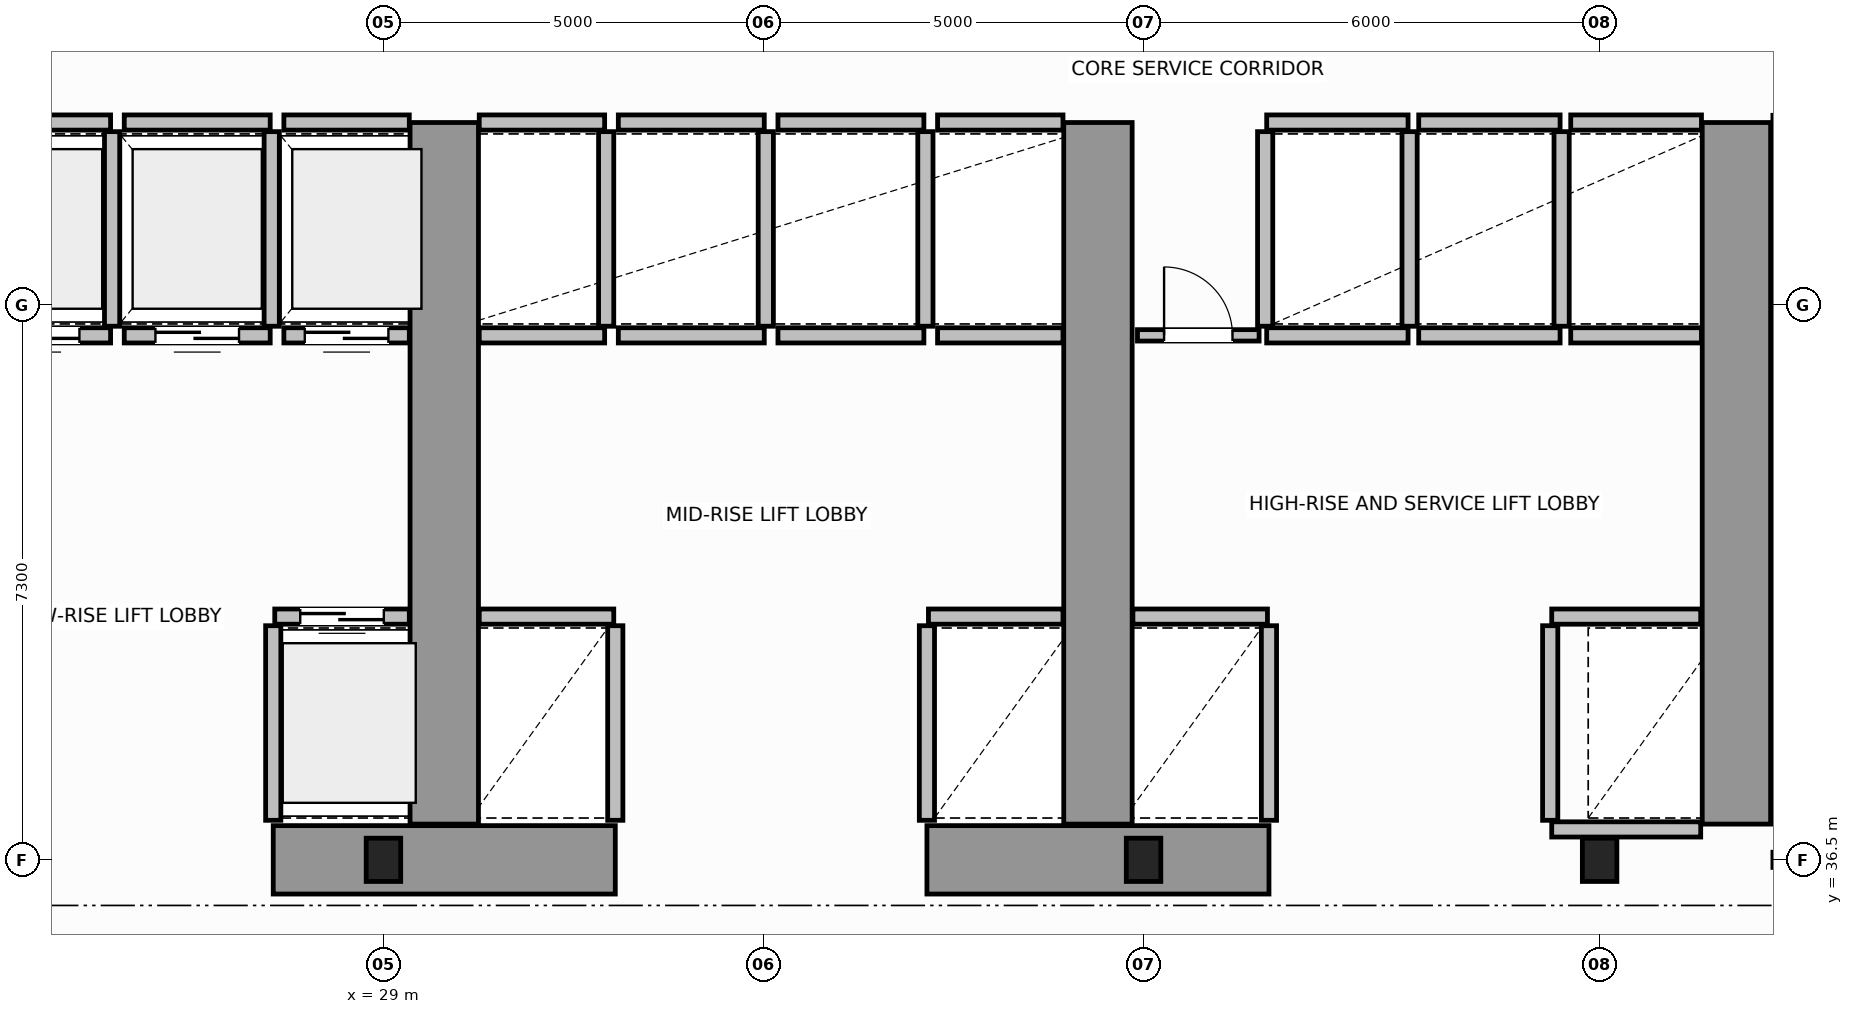
"""IFC4 building model, lengths in metres.
Left out: names, types, materials, properties, quantities, classifications, styles, units other than length and angle.
Written with IfcOpenShell. Run it as: python <this file> out.ifc"""

import sys

from ifc_helpers import new_model, si_unit, direction, frame, frame_2d, origin, origin_2d, place, context, subcontext, project, spatial, rectangle, i_section, extrude, source, transform, mapped, element, fill, save


model = new_model("IFC4")
c1 = context("Model", 3, precision=1e-05, world=origin(), true_north=direction((0.0, 1.0)))
c2 = subcontext(c1, "Body", "Model", "MODEL_VIEW")
j1 = project(units=[si_unit("LENGTHUNIT", "METRE"), si_unit("PLANEANGLEUNIT", "RADIAN")], contexts=[c1])
p1 = place(None, origin())
s1 = spatial("IfcSite", under=j1, at=p1, CompositionType="ELEMENT")
p2 = place(p1, origin())
s2 = spatial("IfcBuilding", under=s1, at=p2, CompositionType="ELEMENT")
p3 = place(p2, frame((0.0, 0.0, 37.8)))
s3 = spatial("IfcBuildingStorey", under=s2, at=p3, CompositionType="ELEMENT", Elevation=37.8)
m1 = source(origin(), c2, "Body", "SweptSolid", [
    extrude(i_section(OverallWidth=0.454, OverallDepth=0.569, WebThickness=0.078, FlangeThickness=0.08, FilletRadius=0.015, at=origin_2d()), origin(), (0.0, 0.0, 1.0), 3.8),
])
for number, where, z_axis, x_axis in (
    (1, (29.0, 36.5, 0.0), (0.0, 0.0, 1.0), (1.0, 0.0, 0.0)),
    (2, (39.0, 36.5, 0.0), (0.0, 0.0, 1.0), (1.0, 0.0, 0.0)),
    (3, (45.0, 36.5, 0.0), (0.0, 0.0, 1.0), (1.0, 0.0, 0.0)),
):
    element("IfcColumn", number, at=place(p3, frame(where, z_axis=z_axis, x_axis=x_axis)), inside=s3, PredefinedType="COLUMN", context=c2, shape_type="MappedRepresentation", body=[
        mapped(m1, transform((0.0, 0.0, 0.0), scale=1.0)),
    ])
for number, where, z_axis, x_axis in (
    (4, (27.55, 36.5, 0.0), (0.0, 0.0, 1.0), (1.0, 0.0, 0.0)),
    (5, (36.15, 36.5, 0.0), (0.0, 0.0, 1.0), (1.0, 0.0, 0.0)),
):
    element("IfcWall", number, at=place(p3, frame(where, z_axis=z_axis, x_axis=x_axis)), inside=s3, PredefinedType="SHEAR", context=c2, shape_type="SweptSolid", body=[
        extrude(rectangle(XDim=4.5, YDim=0.9, at=frame_2d((2.25, 0.0))), origin(), (0.0, 0.0, 1.0), 3.8),
    ])
for number, where, z_axis, x_axis in (
    (6, (29.8, 36.97, 0.0), (0.0, 0.0, 1.0), (0.0, 1.0, 0.0)),
    (7, (38.4, 36.97, 0.0), (0.0, 0.0, 1.0), (0.0, 1.0, 0.0)),
    (8, (46.8, 36.97, 0.0), (0.0, 0.0, 1.0), (0.0, 1.0, 0.0)),
):
    element("IfcWall", number, at=place(p3, frame(where, z_axis=z_axis, x_axis=x_axis)), inside=s3, PredefinedType="SHEAR", context=c2, shape_type="SweptSolid", body=[
        extrude(rectangle(XDim=9.23, YDim=0.9, at=frame_2d((4.615, 0.0))), origin(), (0.0, 0.0, 1.0), 3.8),
    ])
p4 = place(p3, frame((47.28, 36.5, 0.0), z_axis=(0.0, 0.0, 1.0), x_axis=(1.0, 0.0, 0.0)))
e9 = element("IfcWall", 9, at=p4, inside=s3, PredefinedType="SOLIDWALL", context=c2, shape_type="SweptSolid", body=[
    extrude(rectangle(XDim=2.47, YDim=0.2, at=frame_2d((1.235, 0.0))), origin(), (0.0, 0.0, 1.0), 2.37),
])
p5 = place(p4, frame((0.65, 0.0, 0.0)))
e10 = element("IfcOpeningElement", 10, at=p5, cuts=e9, PredefinedType="OPENING", context=c2, shape_type="SweptSolid", body=[
    extrude(rectangle(XDim=1.1, YDim=2.15, at=frame_2d((0.55, 1.075))), frame((0.0, 0.11, 0.0), z_axis=(0.0, -1.0, 0.0), x_axis=(1.0, 0.0, 0.0)), (0.0, 0.0, 1.0), 0.22),
])
p6 = place(p3, frame((27.57, 39.7, 0.0), z_axis=(0.0, 0.0, 1.0), x_axis=(1.0, 0.0, 0.0)))
e11 = element("IfcWall", 11, at=p6, inside=s3, PredefinedType="SOLIDWALL", context=c2, shape_type="SweptSolid", body=[
    extrude(rectangle(XDim=1.77, YDim=0.2, at=frame_2d((0.885, 0.0))), origin(), (0.0, 0.0, 1.0), 3.58),
])
p7 = place(p6, frame((0.335, 0.0, 0.0)))
e12 = element("IfcOpeningElement", 12, at=p7, cuts=e11, PredefinedType="OPENING", context=c2, shape_type="SweptSolid", body=[
    extrude(rectangle(XDim=1.1, YDim=2.15, at=frame_2d((0.55, 1.075))), frame((0.0, 0.11, 0.0), z_axis=(0.0, -1.0, 0.0), x_axis=(1.0, 0.0, 0.0)), (0.0, 0.0, 1.0), 0.22),
])
p8 = place(p3, frame((27.55, 37.02, 0.0), z_axis=(0.0, 0.0, 1.0), x_axis=(0.0, 1.0, 0.0)))
e13 = element("IfcWall", 13, at=p8, inside=s3, PredefinedType="SOLIDWALL", context=c2, shape_type="SweptSolid", body=[
    extrude(rectangle(XDim=2.56, YDim=0.2, at=frame_2d((1.28, 0.0))), origin(), (0.0, 0.0, 1.0), 3.58),
])
p9 = place(p3, frame((23.49, 43.4, 0.0), z_axis=(0.0, 0.0, 1.0), x_axis=(1.0, 0.0, 0.0)))
e14 = element("IfcWall", 14, at=p9, inside=s3, PredefinedType="SOLIDWALL", context=c2, shape_type="SweptSolid", body=[
    extrude(rectangle(XDim=1.92, YDim=0.2, at=frame_2d((0.96, 0.0))), origin(), (0.0, 0.0, 1.0), 3.58),
])
p10 = place(p9, frame((0.41, 0.0, 0.0)))
e15 = element("IfcOpeningElement", 15, at=p10, cuts=e14, PredefinedType="OPENING", context=c2, shape_type="SweptSolid", body=[
    extrude(rectangle(XDim=1.1, YDim=2.15, at=frame_2d((0.55, 1.075))), frame((0.0, 0.11, 0.0), z_axis=(0.0, -1.0, 0.0), x_axis=(1.0, 0.0, 0.0)), (0.0, 0.0, 1.0), 0.22),
])
p11 = place(p3, frame((23.49, 46.2, 0.0), z_axis=(0.0, 0.0, 1.0), x_axis=(1.0, 0.0, 0.0)))
e16 = element("IfcWall", 16, at=p11, inside=s3, PredefinedType="SOLIDWALL", context=c2, shape_type="SweptSolid", body=[
    extrude(rectangle(XDim=1.92, YDim=0.2, at=frame_2d((0.96, 0.0))), origin(), (0.0, 0.0, 1.0), 3.58),
])
p12 = place(p3, frame((25.43, 43.52, 0.0), z_axis=(0.0, 0.0, 1.0), x_axis=(0.0, 1.0, 0.0)))
e17 = element("IfcWall", 17, at=p12, inside=s3, PredefinedType="SOLIDWALL", context=c2, shape_type="SweptSolid", body=[
    extrude(rectangle(XDim=2.56, YDim=0.2, at=frame_2d((1.28, 0.0))), origin(), (0.0, 0.0, 1.0), 3.58),
])
p13 = place(p3, frame((25.59, 43.4, 0.0), z_axis=(0.0, 0.0, 1.0), x_axis=(1.0, 0.0, 0.0)))
e18 = element("IfcWall", 18, at=p13, inside=s3, PredefinedType="SOLIDWALL", context=c2, shape_type="SweptSolid", body=[
    extrude(rectangle(XDim=1.92, YDim=0.2, at=frame_2d((0.96, 0.0))), origin(), (0.0, 0.0, 1.0), 3.58),
])
p14 = place(p13, frame((0.41, 0.0, 0.0)))
e19 = element("IfcOpeningElement", 19, at=p14, cuts=e18, PredefinedType="OPENING", context=c2, shape_type="SweptSolid", body=[
    extrude(rectangle(XDim=1.1, YDim=2.15, at=frame_2d((0.55, 1.075))), frame((0.0, 0.11, 0.0), z_axis=(0.0, -1.0, 0.0), x_axis=(1.0, 0.0, 0.0)), (0.0, 0.0, 1.0), 0.22),
])
p15 = place(p3, frame((25.59, 46.2, 0.0), z_axis=(0.0, 0.0, 1.0), x_axis=(1.0, 0.0, 0.0)))
e20 = element("IfcWall", 20, at=p15, inside=s3, PredefinedType="SOLIDWALL", context=c2, shape_type="SweptSolid", body=[
    extrude(rectangle(XDim=1.92, YDim=0.2, at=frame_2d((0.96, 0.0))), origin(), (0.0, 0.0, 1.0), 3.58),
])
p16 = place(p3, frame((27.53, 43.52, 0.0), z_axis=(0.0, 0.0, 1.0), x_axis=(0.0, 1.0, 0.0)))
e21 = element("IfcWall", 21, at=p16, inside=s3, PredefinedType="SOLIDWALL", context=c2, shape_type="SweptSolid", body=[
    extrude(rectangle(XDim=2.56, YDim=0.2, at=frame_2d((1.28, 0.0))), origin(), (0.0, 0.0, 1.0), 3.58),
])
p17 = place(p3, frame((27.69, 43.4, 0.0), z_axis=(0.0, 0.0, 1.0), x_axis=(1.0, 0.0, 0.0)))
e22 = element("IfcWall", 22, at=p17, inside=s3, PredefinedType="SOLIDWALL", context=c2, shape_type="SweptSolid", body=[
    extrude(rectangle(XDim=1.65, YDim=0.2, at=frame_2d((0.825, 0.0))), origin(), (0.0, 0.0, 1.0), 3.58),
])
p18 = place(p17, frame((0.275, 0.0, 0.0)))
e23 = element("IfcOpeningElement", 23, at=p18, cuts=e22, PredefinedType="OPENING", context=c2, shape_type="SweptSolid", body=[
    extrude(rectangle(XDim=1.1, YDim=2.15, at=frame_2d((0.55, 1.075))), frame((0.0, 0.11, 0.0), z_axis=(0.0, -1.0, 0.0), x_axis=(1.0, 0.0, 0.0)), (0.0, 0.0, 1.0), 0.22),
])
p19 = place(p3, frame((27.69, 46.2, 0.0), z_axis=(0.0, 0.0, 1.0), x_axis=(1.0, 0.0, 0.0)))
e24 = element("IfcWall", 24, at=p19, inside=s3, PredefinedType="SOLIDWALL", context=c2, shape_type="SweptSolid", body=[
    extrude(rectangle(XDim=1.65, YDim=0.2, at=frame_2d((0.825, 0.0))), origin(), (0.0, 0.0, 1.0), 3.58),
])
p20 = place(p3, frame((30.26, 39.7, 0.0), z_axis=(0.0, 0.0, 1.0), x_axis=(1.0, 0.0, 0.0)))
e25 = element("IfcWall", 25, at=p20, inside=s3, PredefinedType="SOLIDWALL", context=c2, shape_type="SweptSolid", body=[
    extrude(rectangle(XDim=1.77, YDim=0.2, at=frame_2d((0.885, 0.0))), origin(), (0.0, 0.0, 1.0), 3.58),
])
p21 = place(p3, frame((32.05, 37.02, 0.0), z_axis=(0.0, 0.0, 1.0), x_axis=(0.0, 1.0, 0.0)))
e26 = element("IfcWall", 26, at=p21, inside=s3, PredefinedType="SOLIDWALL", context=c2, shape_type="SweptSolid", body=[
    extrude(rectangle(XDim=2.56, YDim=0.2, at=frame_2d((1.28, 0.0))), origin(), (0.0, 0.0, 1.0), 3.58),
])
p22 = place(p3, frame((36.17, 39.7, 0.0), z_axis=(0.0, 0.0, 1.0), x_axis=(1.0, 0.0, 0.0)))
e27 = element("IfcWall", 27, at=p22, inside=s3, PredefinedType="SOLIDWALL", context=c2, shape_type="SweptSolid", body=[
    extrude(rectangle(XDim=1.77, YDim=0.2, at=frame_2d((0.885, 0.0))), origin(), (0.0, 0.0, 1.0), 3.58),
])
p23 = place(p3, frame((36.15, 37.02, 0.0), z_axis=(0.0, 0.0, 1.0), x_axis=(0.0, 1.0, 0.0)))
e28 = element("IfcWall", 28, at=p23, inside=s3, PredefinedType="SOLIDWALL", context=c2, shape_type="SweptSolid", body=[
    extrude(rectangle(XDim=2.56, YDim=0.2, at=frame_2d((1.28, 0.0))), origin(), (0.0, 0.0, 1.0), 3.58),
])
for number, where, z_axis, x_axis in (
    (29, (30.26, 43.4, 0.0), (0.0, 0.0, 1.0), (1.0, 0.0, 0.0)),
    (30, (30.26, 46.2, 0.0), (0.0, 0.0, 1.0), (1.0, 0.0, 0.0)),
):
    element("IfcWall", number, at=place(p3, frame(where, z_axis=z_axis, x_axis=x_axis)), inside=s3, PredefinedType="SOLIDWALL", context=c2, shape_type="SweptSolid", body=[
        extrude(rectangle(XDim=1.65, YDim=0.2, at=frame_2d((0.825, 0.0))), origin(), (0.0, 0.0, 1.0), 3.58),
    ])
p24 = place(p3, frame((31.93, 43.52, 0.0), z_axis=(0.0, 0.0, 1.0), x_axis=(0.0, 1.0, 0.0)))
e31 = element("IfcWall", 31, at=p24, inside=s3, PredefinedType="SOLIDWALL", context=c2, shape_type="SweptSolid", body=[
    extrude(rectangle(XDim=2.56, YDim=0.2, at=frame_2d((1.28, 0.0))), origin(), (0.0, 0.0, 1.0), 3.58),
])
for number, where, z_axis, x_axis in (
    (32, (32.09, 43.4, 0.0), (0.0, 0.0, 1.0), (1.0, 0.0, 0.0)),
    (33, (32.09, 46.2, 0.0), (0.0, 0.0, 1.0), (1.0, 0.0, 0.0)),
):
    element("IfcWall", number, at=place(p3, frame(where, z_axis=z_axis, x_axis=x_axis)), inside=s3, PredefinedType="SOLIDWALL", context=c2, shape_type="SweptSolid", body=[
        extrude(rectangle(XDim=1.92, YDim=0.2, at=frame_2d((0.96, 0.0))), origin(), (0.0, 0.0, 1.0), 3.58),
    ])
p25 = place(p3, frame((34.03, 43.52, 0.0), z_axis=(0.0, 0.0, 1.0), x_axis=(0.0, 1.0, 0.0)))
e34 = element("IfcWall", 34, at=p25, inside=s3, PredefinedType="SOLIDWALL", context=c2, shape_type="SweptSolid", body=[
    extrude(rectangle(XDim=2.56, YDim=0.2, at=frame_2d((1.28, 0.0))), origin(), (0.0, 0.0, 1.0), 3.58),
])
for number, where, z_axis, x_axis in (
    (35, (34.19, 43.4, 0.0), (0.0, 0.0, 1.0), (1.0, 0.0, 0.0)),
    (36, (34.19, 46.2, 0.0), (0.0, 0.0, 1.0), (1.0, 0.0, 0.0)),
):
    element("IfcWall", number, at=place(p3, frame(where, z_axis=z_axis, x_axis=x_axis)), inside=s3, PredefinedType="SOLIDWALL", context=c2, shape_type="SweptSolid", body=[
        extrude(rectangle(XDim=1.92, YDim=0.2, at=frame_2d((0.96, 0.0))), origin(), (0.0, 0.0, 1.0), 3.58),
    ])
p26 = place(p3, frame((36.13, 43.52, 0.0), z_axis=(0.0, 0.0, 1.0), x_axis=(0.0, 1.0, 0.0)))
e37 = element("IfcWall", 37, at=p26, inside=s3, PredefinedType="SOLIDWALL", context=c2, shape_type="SweptSolid", body=[
    extrude(rectangle(XDim=2.56, YDim=0.2, at=frame_2d((1.28, 0.0))), origin(), (0.0, 0.0, 1.0), 3.58),
])
for number, where, z_axis, x_axis in (
    (38, (36.29, 43.4, 0.0), (0.0, 0.0, 1.0), (1.0, 0.0, 0.0)),
    (39, (36.29, 46.2, 0.0), (0.0, 0.0, 1.0), (1.0, 0.0, 0.0)),
):
    element("IfcWall", number, at=place(p3, frame(where, z_axis=z_axis, x_axis=x_axis)), inside=s3, PredefinedType="SOLIDWALL", context=c2, shape_type="SweptSolid", body=[
        extrude(rectangle(XDim=1.65, YDim=0.2, at=frame_2d((0.825, 0.0))), origin(), (0.0, 0.0, 1.0), 3.58),
    ])
p27 = place(p3, frame((38.86, 39.7, 0.0), z_axis=(0.0, 0.0, 1.0), x_axis=(1.0, 0.0, 0.0)))
e40 = element("IfcWall", 40, at=p27, inside=s3, PredefinedType="SOLIDWALL", context=c2, shape_type="SweptSolid", body=[
    extrude(rectangle(XDim=1.77, YDim=0.2, at=frame_2d((0.885, 0.0))), origin(), (0.0, 0.0, 1.0), 3.58),
])
p28 = place(p3, frame((40.65, 37.02, 0.0), z_axis=(0.0, 0.0, 1.0), x_axis=(0.0, 1.0, 0.0)))
e41 = element("IfcWall", 41, at=p28, inside=s3, PredefinedType="SOLIDWALL", context=c2, shape_type="SweptSolid", body=[
    extrude(rectangle(XDim=2.56, YDim=0.2, at=frame_2d((1.28, 0.0))), origin(), (0.0, 0.0, 1.0), 3.58),
])
p29 = place(p3, frame((44.37, 39.7, 0.0), z_axis=(0.0, 0.0, 1.0), x_axis=(1.0, 0.0, 0.0)))
e42 = element("IfcWall", 42, at=p29, inside=s3, PredefinedType="SOLIDWALL", context=c2, shape_type="SweptSolid", body=[
    extrude(rectangle(XDim=1.96, YDim=0.2, at=frame_2d((0.98, 0.0))), origin(), (0.0, 0.0, 1.0), 3.58),
])
p30 = place(p3, frame((44.37, 36.9, 0.0), z_axis=(0.0, 0.0, 1.0), x_axis=(1.0, 0.0, 0.0)))
e43 = element("IfcWall", 43, at=p30, inside=s3, PredefinedType="SOLIDWALL", context=c2, shape_type="SweptSolid", body=[
    extrude(rectangle(XDim=1.96, YDim=0.2, at=frame_2d((0.98, 0.0))), origin(), (0.0, 0.0, 1.0), 2.37),
])
p31 = place(p3, frame((44.35, 37.02, 0.0), z_axis=(0.0, 0.0, 1.0), x_axis=(0.0, 1.0, 0.0)))
e44 = element("IfcWall", 44, at=p31, inside=s3, PredefinedType="SOLIDWALL", context=c2, shape_type="SweptSolid", body=[
    extrude(rectangle(XDim=2.56, YDim=0.2, at=frame_2d((1.28, 0.0))), origin(), (0.0, 0.0, 1.0), 3.58),
])
for number, where, z_axis, x_axis in (
    (45, (40.62, 43.4, 0.0), (0.0, 0.0, 1.0), (1.0, 0.0, 0.0)),
    (46, (40.62, 46.2, 0.0), (0.0, 0.0, 1.0), (1.0, 0.0, 0.0)),
):
    element("IfcWall", number, at=place(p3, frame(where, z_axis=z_axis, x_axis=x_axis)), inside=s3, PredefinedType="SOLIDWALL", context=c2, shape_type="SweptSolid", body=[
        extrude(rectangle(XDim=1.86, YDim=0.2, at=frame_2d((0.93, 0.0))), origin(), (0.0, 0.0, 1.0), 3.58),
    ])
for number, where, z_axis, x_axis in (
    (47, (40.6, 43.52, 0.0), (0.0, 0.0, 1.0), (0.0, 1.0, 0.0)),
    (48, (42.5, 43.52, 0.0), (0.0, 0.0, 1.0), (0.0, 1.0, 0.0)),
):
    element("IfcWall", number, at=place(p3, frame(where, z_axis=z_axis, x_axis=x_axis)), inside=s3, PredefinedType="SOLIDWALL", context=c2, shape_type="SweptSolid", body=[
        extrude(rectangle(XDim=2.56, YDim=0.2, at=frame_2d((1.28, 0.0))), origin(), (0.0, 0.0, 1.0), 3.58),
    ])
for number, where, z_axis, x_axis in (
    (49, (42.62, 43.4, 0.0), (0.0, 0.0, 1.0), (1.0, 0.0, 0.0)),
    (50, (42.62, 46.2, 0.0), (0.0, 0.0, 1.0), (1.0, 0.0, 0.0)),
):
    element("IfcWall", number, at=place(p3, frame(where, z_axis=z_axis, x_axis=x_axis)), inside=s3, PredefinedType="SOLIDWALL", context=c2, shape_type="SweptSolid", body=[
        extrude(rectangle(XDim=1.86, YDim=0.2, at=frame_2d((0.93, 0.0))), origin(), (0.0, 0.0, 1.0), 3.58),
    ])
p32 = place(p3, frame((44.5, 43.52, 0.0), z_axis=(0.0, 0.0, 1.0), x_axis=(0.0, 1.0, 0.0)))
e51 = element("IfcWall", 51, at=p32, inside=s3, PredefinedType="SOLIDWALL", context=c2, shape_type="SweptSolid", body=[
    extrude(rectangle(XDim=2.56, YDim=0.2, at=frame_2d((1.28, 0.0))), origin(), (0.0, 0.0, 1.0), 3.58),
])
for number, where, z_axis, x_axis in (
    (52, (44.62, 43.4, 0.0), (0.0, 0.0, 1.0), (1.0, 0.0, 0.0)),
    (53, (44.62, 46.2, 0.0), (0.0, 0.0, 1.0), (1.0, 0.0, 0.0)),
):
    element("IfcWall", number, at=place(p3, frame(where, z_axis=z_axis, x_axis=x_axis)), inside=s3, PredefinedType="SOLIDWALL", context=c2, shape_type="SweptSolid", body=[
        extrude(rectangle(XDim=1.72, YDim=0.2, at=frame_2d((0.86, 0.0))), origin(), (0.0, 0.0, 1.0), 3.58),
    ])
p33 = place(p3, frame((47.26, 39.95, 0.0), z_axis=(0.0, 0.0, 1.0), x_axis=(1.0, 0.0, 0.0)))
e54 = element("IfcWall", 54, at=p33, inside=s3, PredefinedType="SOLIDWALL", context=c2, shape_type="SweptSolid", body=[
    extrude(rectangle(XDim=2.07, YDim=0.2, at=frame_2d((1.035, 0.0))), origin(), (0.0, 0.0, 1.0), 3.58),
])
p34 = place(p33, frame((0.485, 0.0, 0.0)))
e55 = element("IfcOpeningElement", 55, at=p34, cuts=e54, PredefinedType="OPENING", context=c2, shape_type="SweptSolid", body=[
    extrude(rectangle(XDim=1.1, YDim=2.15, at=frame_2d((0.55, 1.075))), frame((0.0, 0.11, 0.0), z_axis=(0.0, -1.0, 0.0), x_axis=(1.0, 0.0, 0.0)), (0.0, 0.0, 1.0), 0.22),
])
p35 = place(p3, frame((47.26, 42.75, 0.0), z_axis=(0.0, 0.0, 1.0), x_axis=(1.0, 0.0, 0.0)))
e56 = element("IfcWall", 56, at=p35, inside=s3, PredefinedType="SOLIDWALL", context=c2, shape_type="SweptSolid", body=[
    extrude(rectangle(XDim=2.07, YDim=0.2, at=frame_2d((1.035, 0.0))), origin(), (0.0, 0.0, 1.0), 3.58),
])
p36 = place(p3, frame((47.28, 46.22, 0.0), z_axis=(0.0, 0.0, 1.0), x_axis=(1.0, 0.0, 0.0)))
e57 = element("IfcWall", 57, at=p36, inside=s3, PredefinedType="PARTITIONING", context=c2, shape_type="SweptSolid", body=[
    extrude(rectangle(XDim=2.1, YDim=0.15, at=frame_2d((1.05, 0.0))), origin(), (0.0, 0.0, 1.0), 3.58),
])
p37 = place(p36, frame((0.55, 0.0, 0.0)))
e58 = element("IfcOpeningElement", 58, at=p37, cuts=e57, PredefinedType="OPENING", context=c2, shape_type="SweptSolid", body=[
    extrude(rectangle(XDim=0.9, YDim=2.1, at=frame_2d((0.45, 1.05))), frame((0.0, 0.085, 0.0), z_axis=(0.0, -1.0, 0.0), x_axis=(1.0, 0.0, 0.0)), (0.0, 0.0, 1.0), 0.17),
])
p38 = place(p3, frame((38.92, 43.4, 0.0), z_axis=(0.0, 0.0, 1.0), x_axis=(1.0, 0.0, 0.0)))
e59 = element("IfcWall", 59, at=p38, inside=s3, PredefinedType="PARTITIONING", context=c2, shape_type="SweptSolid", body=[
    extrude(rectangle(XDim=1.6, YDim=0.15, at=frame_2d((0.8, 0.0))), origin(), (0.0, 0.0, 1.0), 3.58),
])
p39 = place(p38, frame((0.35, 0.0, 0.0)))
e60 = element("IfcOpeningElement", 60, at=p39, cuts=e59, PredefinedType="OPENING", context=c2, shape_type="SweptSolid", body=[
    extrude(rectangle(XDim=0.9, YDim=2.1, at=frame_2d((0.45, 1.05))), frame((0.0, 0.085, 0.0), z_axis=(0.0, -1.0, 0.0), x_axis=(1.0, 0.0, 0.0)), (0.0, 0.0, 1.0), 0.17),
])
m2 = source(origin(), c2, "Body", "SweptSolid", [
    extrude(rectangle(XDim=1.1, YDim=2.15, at=frame_2d((0.55, 1.075))), frame((0.0, 0.025, 0.0), z_axis=(0.0, -1.0, 0.0), x_axis=(1.0, 0.0, 0.0)), (0.0, 0.0, 1.0), 0.05),
])
p40 = place(p7, origin())
e61 = element("IfcDoor", 61, at=p40, inside=s3, OperationType="DOUBLE_DOOR_SLIDING", PredefinedType="DOOR", context=c2, shape_type="MappedRepresentation", body=[
    mapped(m2, transform((0.0, 0.0, 0.0), scale=1.0)),
])
fill(e12, e61)
p41 = place(p10, origin())
e62 = element("IfcDoor", 62, at=p41, inside=s3, OperationType="DOUBLE_DOOR_SLIDING", PredefinedType="DOOR", context=c2, shape_type="MappedRepresentation", body=[
    mapped(m2, transform((0.0, 0.0, 0.0), scale=1.0)),
])
fill(e15, e62)
p42 = place(p14, origin())
e63 = element("IfcDoor", 63, at=p42, inside=s3, OperationType="DOUBLE_DOOR_SLIDING", PredefinedType="DOOR", context=c2, shape_type="MappedRepresentation", body=[
    mapped(m2, transform((0.0, 0.0, 0.0), scale=1.0)),
])
fill(e19, e63)
p43 = place(p18, origin())
e64 = element("IfcDoor", 64, at=p43, inside=s3, OperationType="DOUBLE_DOOR_SLIDING", PredefinedType="DOOR", context=c2, shape_type="MappedRepresentation", body=[
    mapped(m2, transform((0.0, 0.0, 0.0), scale=1.0)),
])
fill(e23, e64)
m3 = source(origin(), c2, "Body", "SweptSolid", [
    extrude(rectangle(XDim=0.9, YDim=2.1, at=frame_2d((0.45, 1.05))), frame((0.0, 0.025, 0.0), z_axis=(0.0, -1.0, 0.0), x_axis=(1.0, 0.0, 0.0)), (0.0, 0.0, 1.0), 0.05),
])
p44 = place(p39, origin())
e65 = element("IfcDoor", 65, at=p44, inside=s3, OperationType="SINGLE_SWING_LEFT", PredefinedType="DOOR", context=c2, shape_type="MappedRepresentation", body=[
    mapped(m3, transform((0.0, 0.0, 0.0), scale=1.0)),
])
fill(e60, e65)
save(model, sys.argv[1])
